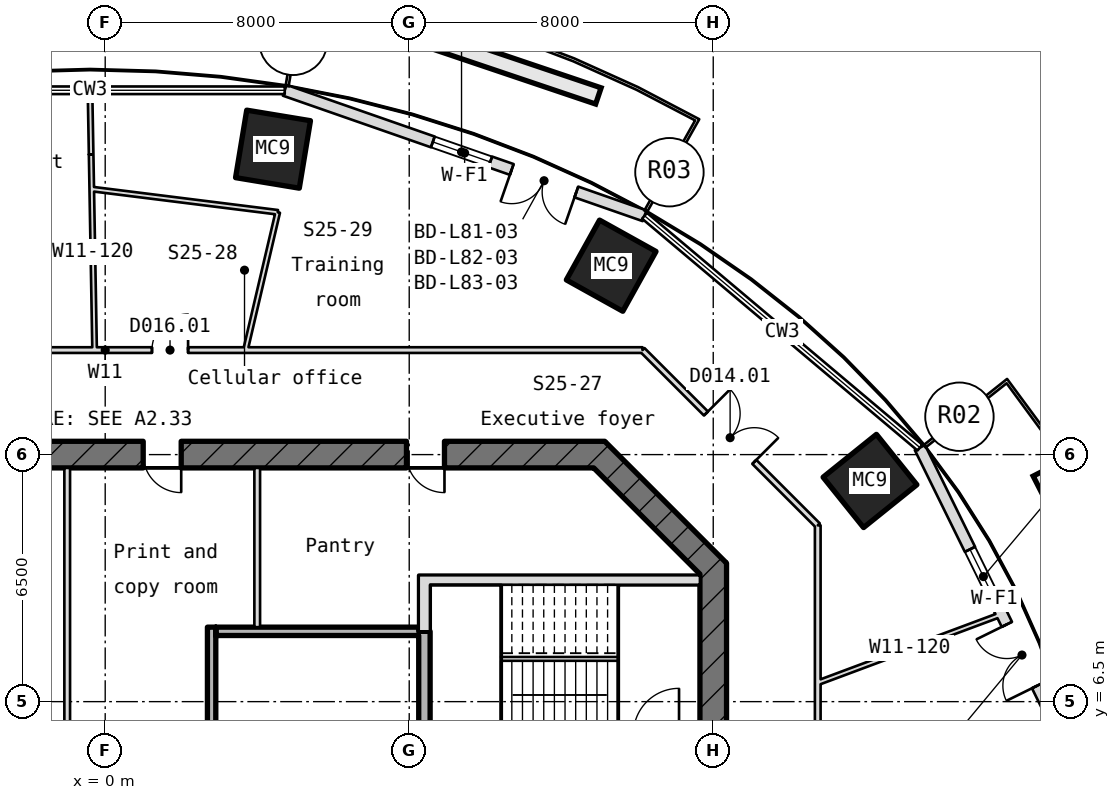
"""IFC4 building model, lengths in metres.
Left out: names, types, materials, properties, quantities, classifications, styles, units other than length and angle.
Written with IfcOpenShell. Run it as: python <this file> out.ifc"""

import sys

from ifc_helpers import new_model, si_unit, direction, frame, frame_2d, origin, origin_2d, place, context, subcontext, project, spatial, rectangle, hollow_rectangle, extrude, element, fill, save


model = new_model("IFC4")
c1 = context("Model", 3, precision=1e-05, world=origin(), true_north=direction((0.0, 1.0)))
c2 = subcontext(c1, "Body", "Model", "MODEL_VIEW")
j1 = project(units=[si_unit("LENGTHUNIT", "METRE"), si_unit("PLANEANGLEUNIT", "RADIAN")], contexts=[c1])
p1 = place(None, origin())
s1 = spatial("IfcSite", under=j1, at=p1, CompositionType="ELEMENT")
p2 = place(p1, origin())
s2 = spatial("IfcBuilding", under=s1, at=p2, CompositionType="ELEMENT")
p3 = place(p2, frame((0.0, 0.0, 359.2)))
s3 = spatial("IfcBuildingStorey", under=s2, at=p3, CompositionType="ELEMENT", Elevation=359.2)
for number, where, z_axis, x_axis in (
    (1, (20.125, 12.306, -0.18), (0.0, 0.0, 1.0), (0.626, -0.78, 0.0)),
    (2, (13.314, 17.971, -0.18), (0.0, 0.0, 1.0), (0.874, -0.486, 0.0)),
    (3, (4.416, 21.037, -0.18), (0.0, 0.0, 1.0), (0.987, -0.163, 0.0)),
):
    element("IfcColumn", number, at=place(p3, frame(where, z_axis=z_axis, x_axis=x_axis)), inside=s3, PredefinedType="COLUMN", context=c2, shape_type="SweptSolid", body=[
        extrude(hollow_rectangle(XDim=1.7, YDim=1.8, WallThickness=0.05, at=origin_2d()), origin(), (0.0, 0.0, 1.0), 4.15),
    ])
p4 = place(p3, frame((25.36, 5.214, 0.0), z_axis=(0.0, 0.0, 1.0), x_axis=(-0.441487983718, 0.897267162128, 0.0)))
e4 = element("IfcWall", 4, at=p4, inside=s3, PredefinedType="SOLIDWALL", context=c2, shape_type="SweptSolid", body=[
    extrude(rectangle(XDim=8.883, YDim=0.3, at=frame_2d((4.442, 0.0))), origin(), (0.0, 0.0, 1.0), 3.97),
])
p5 = place(p4, frame((1.9, 0.0, 0.0)))
e5 = element("IfcOpeningElement", 5, at=p5, cuts=e4, PredefinedType="OPENING", context=c2, shape_type="SweptSolid", body=[
    extrude(rectangle(XDim=1.8, YDim=2.4, at=frame_2d((0.9, 1.2))), frame((0.0, 0.16, 0.0), z_axis=(0.0, -1.0, 0.0), x_axis=(1.0, 0.0, 0.0)), (0.0, 0.0, 1.0), 0.32),
])
p6 = place(p4, frame((4.3, 0.0, 0.9)))
e6 = element("IfcOpeningElement", 6, at=p6, cuts=e4, PredefinedType="OPENING", context=c2, shape_type="SweptSolid", body=[
    extrude(rectangle(XDim=1.6, YDim=1.5, at=frame_2d((0.8, 0.75))), frame((0.0, 0.16, 0.0), z_axis=(0.0, -1.0, 0.0), x_axis=(1.0, 0.0, 0.0)), (0.0, 0.0, 1.0), 0.32),
])
p7 = place(p3, frame((14.192, 19.285, 0.0), z_axis=(0.0, 0.0, 1.0), x_axis=(-0.944239971919, 0.329258068133, 0.0)))
e7 = element("IfcWall", 7, at=p7, inside=s3, PredefinedType="SOLIDWALL", context=c2, shape_type="SweptSolid", body=[
    extrude(rectangle(XDim=10.027, YDim=0.3, at=frame_2d((5.014, 0.0))), origin(), (0.0, 0.0, 1.0), 3.97),
])
p8 = place(p7, frame((1.9, 0.0, 0.0)))
e8 = element("IfcOpeningElement", 8, at=p8, cuts=e7, PredefinedType="OPENING", context=c2, shape_type="SweptSolid", body=[
    extrude(rectangle(XDim=1.8, YDim=2.4, at=frame_2d((0.9, 1.2))), frame((0.0, 0.16, 0.0), z_axis=(0.0, -1.0, 0.0), x_axis=(1.0, 0.0, 0.0)), (0.0, 0.0, 1.0), 0.32),
])
p9 = place(p7, frame((4.3, 0.0, 0.9)))
e9 = element("IfcOpeningElement", 9, at=p9, cuts=e7, PredefinedType="OPENING", context=c2, shape_type="SweptSolid", body=[
    extrude(rectangle(XDim=1.6, YDim=1.5, at=frame_2d((0.8, 0.75))), frame((0.0, 0.16, 0.0), z_axis=(0.0, -1.0, 0.0), x_axis=(1.0, 0.0, 0.0)), (0.0, 0.0, 1.0), 0.32),
])
p10 = place(p3, frame((16.0, -10.145, -0.18), z_axis=(0.0, 0.0, 1.0), x_axis=(0.0, 1.0, 0.0)))
e10 = element("IfcWall", 10, at=p10, inside=s3, PredefinedType="SHEAR", context=c2, shape_type="SweptSolid", body=[
    extrude(rectangle(XDim=20.29, YDim=0.7, at=frame_2d((10.145, 0.0))), origin(), (0.0, 0.0, 1.0), 4.15),
])
p11 = place(p10, frame((8.945, 0.0, 0.18)))
e11 = element("IfcOpeningElement", 11, at=p11, cuts=e10, PredefinedType="OPENING", context=c2, shape_type="SweptSolid", body=[
    extrude(rectangle(XDim=2.4, YDim=2.1, at=frame_2d((1.2, 1.05))), frame((0.0, 0.36, 0.0), z_axis=(0.0, -1.0, 0.0), x_axis=(1.0, 0.0, 0.0)), (0.0, 0.0, 1.0), 0.72),
])
p12 = place(p10, frame((13.545, 0.0, 0.18)))
e12 = element("IfcOpeningElement", 12, at=p12, cuts=e10, PredefinedType="OPENING", context=c2, shape_type="SweptSolid", body=[
    extrude(rectangle(XDim=1.2, YDim=2.1, at=frame_2d((0.6, 1.05))), frame((0.0, 0.36, 0.0), z_axis=(0.0, -1.0, 0.0), x_axis=(1.0, 0.0, 0.0)), (0.0, 0.0, 1.0), 0.72),
])
p13 = place(p10, frame((2.4, 0.0, 0.18)))
e13 = element("IfcOpeningElement", 13, at=p13, cuts=e10, PredefinedType="OPENING", context=c2, shape_type="SweptSolid", body=[
    extrude(rectangle(XDim=1.2, YDim=2.1, at=frame_2d((0.6, 1.05))), frame((0.0, 0.36, 0.0), z_axis=(0.0, -1.0, 0.0), x_axis=(1.0, 0.0, 0.0)), (0.0, 0.0, 1.0), 0.72),
])
p14 = place(p3, frame((16.103, 9.897, -0.18), z_axis=(0.0, 0.0, 1.0), x_axis=(-0.707106781187, 0.707106781187, 0.0)))
e14 = element("IfcWall", 14, at=p14, inside=s3, PredefinedType="SHEAR", context=c2, shape_type="SweptSolid", body=[
    extrude(rectangle(XDim=4.533, YDim=0.7, at=frame_2d((2.266, 0.0))), origin(), (0.0, 0.0, 1.0), 4.15),
])
p15 = place(p3, frame((13.145, 13.0, -0.18), z_axis=(0.0, 0.0, 1.0), x_axis=(-1.0, 0.0, 0.0)))
e15 = element("IfcWall", 15, at=p15, inside=s3, PredefinedType="SHEAR", context=c2, shape_type="SweptSolid", body=[
    extrude(rectangle(XDim=26.29, YDim=0.7, at=frame_2d((13.145, 0.0))), origin(), (0.0, 0.0, 1.0), 4.15),
])
p16 = place(p15, frame((22.573, 0.0, 0.18)))
e16 = element("IfcOpeningElement", 16, at=p16, cuts=e15, PredefinedType="OPENING", context=c2, shape_type="SweptSolid", body=[
    extrude(rectangle(XDim=1.0, YDim=2.1, at=frame_2d((0.5, 1.05))), frame((0.0, 0.36, 0.0), z_axis=(0.0, -1.0, 0.0), x_axis=(1.0, 0.0, 0.0)), (0.0, 0.0, 1.0), 0.72),
])
p17 = place(p15, frame((16.645, 0.0, 0.18)))
e17 = element("IfcOpeningElement", 17, at=p17, cuts=e15, PredefinedType="OPENING", context=c2, shape_type="SweptSolid", body=[
    extrude(rectangle(XDim=1.0, YDim=2.1, at=frame_2d((0.5, 1.05))), frame((0.0, 0.36, 0.0), z_axis=(0.0, -1.0, 0.0), x_axis=(1.0, 0.0, 0.0)), (0.0, 0.0, 1.0), 0.72),
])
p18 = place(p15, frame((11.145, 0.0, 0.18)))
e18 = element("IfcOpeningElement", 18, at=p18, cuts=e15, PredefinedType="OPENING", context=c2, shape_type="SweptSolid", body=[
    extrude(rectangle(XDim=1.0, YDim=2.1, at=frame_2d((0.5, 1.05))), frame((0.0, 0.36, 0.0), z_axis=(0.0, -1.0, 0.0), x_axis=(1.0, 0.0, 0.0)), (0.0, 0.0, 1.0), 0.72),
])
p19 = place(p15, frame((4.217, 0.0, 0.18)))
e19 = element("IfcOpeningElement", 19, at=p19, cuts=e15, PredefinedType="OPENING", context=c2, shape_type="SweptSolid", body=[
    extrude(rectangle(XDim=1.0, YDim=2.1, at=frame_2d((0.5, 1.05))), frame((0.0, 0.36, 0.0), z_axis=(0.0, -1.0, 0.0), x_axis=(1.0, 0.0, 0.0)), (0.0, 0.0, 1.0), 0.72),
])
p20 = place(p3, frame((2.91, 8.35, 0.0), z_axis=(0.0, 0.0, 1.0), x_axis=(1.0, 0.0, 0.0)))
e20 = element("IfcWall", 20, at=p20, inside=s3, PredefinedType="STANDARD", context=c2, shape_type="SweptSolid", body=[
    extrude(rectangle(XDim=5.34, YDim=0.22, at=frame_2d((2.67, 0.0))), origin(), (0.0, 0.0, 1.0), 3.97),
])
p21 = place(p3, frame((8.55, 9.7, -0.18), z_axis=(0.0, 0.0, 1.0), x_axis=(1.0, 0.0, 0.0)))
e21 = element("IfcWall", 21, at=p21, inside=s3, PredefinedType="SHEAR", context=c2, shape_type="SweptSolid", body=[
    extrude(rectangle(XDim=7.1, YDim=0.25, at=frame_2d((3.55, 0.0))), origin(), (0.0, 0.0, 1.0), 4.15),
])
p22 = place(p3, frame((-1.0, 5.425, 0.0), z_axis=(0.0, 0.0, 1.0), x_axis=(0.0, 1.0, 0.0)))
e22 = element("IfcWall", 22, at=p22, inside=s3, PredefinedType="PARTITIONING", context=c2, shape_type="SweptSolid", body=[
    extrude(rectangle(XDim=7.225, YDim=0.15, at=frame_2d((3.612, 0.0))), origin(), (0.0, 0.0, 1.0), 3.97),
])
p23 = place(p3, frame((2.8, 5.46, 0.0), z_axis=(0.0, 0.0, 1.0), x_axis=(0.0, 1.0, 0.0)))
e23 = element("IfcWall", 23, at=p23, inside=s3, PredefinedType="STANDARD", context=c2, shape_type="SweptSolid", body=[
    extrude(rectangle(XDim=3.0, YDim=0.22, at=frame_2d((1.5, 0.0))), origin(), (0.0, 0.0, 1.0), 3.97),
])
p24 = place(p3, frame((4.0, 8.46, 0.0), z_axis=(0.0, 0.0, 1.0), x_axis=(0.0, 1.0, 0.0)))
e24 = element("IfcWall", 24, at=p24, inside=s3, PredefinedType="PARTITIONING", context=c2, shape_type="SweptSolid", body=[
    extrude(rectangle(XDim=4.19, YDim=0.15, at=frame_2d((2.095, 0.0))), origin(), (0.0, 0.0, 1.0), 3.97),
])
p25 = place(p3, frame((8.4, 2.5, -0.18), z_axis=(0.0, 0.0, 1.0), x_axis=(0.0, 1.0, 0.0)))
e25 = element("IfcWall", 25, at=p25, inside=s3, PredefinedType="SHEAR", context=c2, shape_type="SweptSolid", body=[
    extrude(rectangle(XDim=5.85, YDim=0.3, at=frame_2d((2.925, 0.0))), origin(), (0.0, 0.0, 1.0), 4.15),
])
p26 = place(p3, frame((8.4, 8.35, -0.18), z_axis=(0.0, 0.0, 1.0), x_axis=(0.0, 1.0, 0.0)))
e26 = element("IfcWall", 26, at=p26, inside=s3, PredefinedType="SHEAR", context=c2, shape_type="SweptSolid", body=[
    extrude(rectangle(XDim=1.475, YDim=0.3, at=frame_2d((0.737, 0.0))), origin(), (0.0, 0.0, 1.0), 4.15),
])
p27 = place(p3, frame((-14.139, 15.75, 0.0), z_axis=(0.0, 0.0, 1.0), x_axis=(1.0, 0.0, 0.0)))
e27 = element("IfcWall", 27, at=p27, inside=s3, PredefinedType="PARTITIONING", context=c2, shape_type="SweptSolid", body=[
    extrude(rectangle(XDim=28.278, YDim=0.15, at=frame_2d((14.139, 0.0))), origin(), (0.0, 0.0, 1.0), 3.97),
])
p28 = place(p27, frame((15.37, 0.0, 0.0)))
e28 = element("IfcOpeningElement", 28, at=p28, cuts=e27, PredefinedType="OPENING", context=c2, shape_type="SweptSolid", body=[
    extrude(rectangle(XDim=0.95, YDim=2.1, at=frame_2d((0.475, 1.05))), frame((0.0, 0.085, 0.0), z_axis=(0.0, -1.0, 0.0), x_axis=(1.0, 0.0, 0.0)), (0.0, 0.0, 1.0), 0.17),
])
p29 = place(p27, frame((10.081, 0.0, 0.0)))
e29 = element("IfcOpeningElement", 29, at=p29, cuts=e27, PredefinedType="OPENING", context=c2, shape_type="SweptSolid", body=[
    extrude(rectangle(XDim=0.95, YDim=2.1, at=frame_2d((0.475, 1.05))), frame((0.0, 0.085, 0.0), z_axis=(0.0, -1.0, 0.0), x_axis=(1.0, 0.0, 0.0)), (0.0, 0.0, 1.0), 0.17),
])
p30 = place(p27, frame((5.076, 0.0, 0.0)))
e30 = element("IfcOpeningElement", 30, at=p30, cuts=e27, PredefinedType="OPENING", context=c2, shape_type="SweptSolid", body=[
    extrude(rectangle(XDim=0.95, YDim=2.1, at=frame_2d((0.475, 1.05))), frame((0.0, 0.085, 0.0), z_axis=(0.0, -1.0, 0.0), x_axis=(1.0, 0.0, 0.0)), (0.0, 0.0, 1.0), 0.17),
])
p31 = place(p27, frame((1.45, 0.0, 0.0)))
e31 = element("IfcOpeningElement", 31, at=p31, cuts=e27, PredefinedType="OPENING", context=c2, shape_type="SweptSolid", body=[
    extrude(rectangle(XDim=0.95, YDim=2.1, at=frame_2d((0.475, 1.05))), frame((0.0, 0.085, 0.0), z_axis=(0.0, -1.0, 0.0), x_axis=(1.0, 0.0, 0.0)), (0.0, 0.0, 1.0), 0.17),
])
p32 = place(p3, frame((-0.279, 15.75, 0.0), z_axis=(0.0, 0.0, 1.0), x_axis=(-0.017734938517, 0.99984272361, 0.0)))
e32 = element("IfcWall", 32, at=p32, inside=s3, PredefinedType="PARTITIONING", context=c2, shape_type="SweptSolid", body=[
    extrude(rectangle(XDim=5.148, YDim=0.12, at=frame_2d((2.574, 0.0))), origin(), (0.0, 0.0, 1.0), 3.617),
])
p33 = place(p3, frame((-0.37, 20.898, 0.0), z_axis=(0.0, 0.0, 1.0), x_axis=(-0.017637510488, 0.999844447014, 0.0)))
e33 = element("IfcWall", 33, at=p33, inside=s3, PredefinedType="PARTITIONING", context=c2, shape_type="SweptSolid", body=[
    extrude(rectangle(XDim=1.689, YDim=0.12, at=frame_2d((0.844, 0.0))), origin(), (0.0, 0.0, 1.0), 3.97),
])
p34 = place(p3, frame((4.541, 19.376, 0.0), z_axis=(0.0, 0.0, 1.0), x_axis=(-0.99227254585, 0.124077374056, 0.0)))
e34 = element("IfcWall", 34, at=p34, inside=s3, PredefinedType="PARTITIONING", context=c2, shape_type="SweptSolid", body=[
    extrude(rectangle(XDim=4.933, YDim=0.12, at=frame_2d((2.466, 0.0))), origin(), (0.0, 0.0, 1.0), 3.97),
])
p35 = place(p3, frame((4.541, 19.376, 0.0), z_axis=(0.0, 0.0, 1.0), x_axis=(-0.228180642974, -0.973618813588, 0.0)))
e35 = element("IfcWall", 35, at=p35, inside=s3, PredefinedType="PARTITIONING", context=c2, shape_type="SweptSolid", body=[
    extrude(rectangle(XDim=3.724, YDim=0.12, at=frame_2d((1.862, 0.0))), origin(), (0.0, 0.0, 1.0), 3.97),
])
p36 = place(p3, frame((14.139, 15.75, 0.0), z_axis=(0.0, 0.0, 1.0), x_axis=(0.707106781187, -0.707106781187, 0.0)))
e36 = element("IfcWall", 36, at=p36, inside=s3, PredefinedType="PARTITIONING", context=c2, shape_type="SweptSolid", body=[
    extrude(rectangle(XDim=6.521, YDim=0.15, at=frame_2d((3.26, 0.0))), origin(), (0.0, 0.0, 1.0), 3.97),
])
p37 = place(p36, frame((2.36, 0.0, 0.0)))
e37 = element("IfcOpeningElement", 37, at=p37, cuts=e36, PredefinedType="OPENING", context=c2, shape_type="SweptSolid", body=[
    extrude(rectangle(XDim=1.8, YDim=2.1, at=frame_2d((0.9, 1.05))), frame((0.0, 0.085, 0.0), z_axis=(0.0, -1.0, 0.0), x_axis=(1.0, 0.0, 0.0)), (0.0, 0.0, 1.0), 0.17),
])
p38 = place(p3, frame((18.75, 6.995, 0.0), z_axis=(0.0, 0.0, 1.0), x_axis=(0.936919672461, 0.349544742994, 0.0)))
e38 = element("IfcWall", 38, at=p38, inside=s3, PredefinedType="PARTITIONING", context=c2, shape_type="SweptSolid", body=[
    extrude(rectangle(XDim=5.171, YDim=0.12, at=frame_2d((2.585, 0.0))), origin(), (0.0, 0.0, 1.0), 3.97),
])
p39 = place(p3, frame((18.75, 11.139, 0.0), z_axis=(0.0, 0.0, 1.0), x_axis=(0.0, -1.0, 0.0)))
e39 = element("IfcWall", 39, at=p39, inside=s3, PredefinedType="PARTITIONING", context=c2, shape_type="SweptSolid", body=[
    extrude(rectangle(XDim=22.278, YDim=0.15, at=frame_2d((11.139, 0.0))), origin(), (0.0, 0.0, 1.0), 3.97),
])
p40 = place(p39, frame((12.736, 0.0, 0.0)))
e40 = element("IfcOpeningElement", 40, at=p40, cuts=e39, PredefinedType="OPENING", context=c2, shape_type="SweptSolid", body=[
    extrude(rectangle(XDim=0.95, YDim=2.1, at=frame_2d((0.475, 1.05))), frame((0.0, 0.085, 0.0), z_axis=(0.0, -1.0, 0.0), x_axis=(1.0, 0.0, 0.0)), (0.0, 0.0, 1.0), 0.17),
])
p41 = place(p5, origin())
e41 = element("IfcDoor", 41, at=p41, inside=s3, OperationType="SINGLE_SWING_LEFT", PredefinedType="DOOR", context=c2, shape_type="SweptSolid", body=[
    extrude(rectangle(XDim=1.8, YDim=2.4, at=frame_2d((0.9, 1.2))), frame((0.0, 0.025, 0.0), z_axis=(0.0, -1.0, 0.0), x_axis=(1.0, 0.0, 0.0)), (0.0, 0.0, 1.0), 0.05),
])
fill(e5, e41)
p42 = place(p6, origin())
e42 = element("IfcWindow", 42, at=p42, inside=s3, PartitioningType="SINGLE_PANEL", PredefinedType="WINDOW", context=c2, shape_type="SweptSolid", body=[
    extrude(rectangle(XDim=1.6, YDim=1.5, at=frame_2d((0.8, 0.75))), frame((0.0, 0.03, 0.0), z_axis=(0.0, -1.0, 0.0), x_axis=(1.0, 0.0, 0.0)), (0.0, 0.0, 1.0), 0.06),
])
fill(e6, e42)
p43 = place(p8, origin())
e43 = element("IfcDoor", 43, at=p43, inside=s3, OperationType="SINGLE_SWING_LEFT", PredefinedType="DOOR", context=c2, shape_type="SweptSolid", body=[
    extrude(rectangle(XDim=1.8, YDim=2.4, at=frame_2d((0.9, 1.2))), frame((0.0, 0.025, 0.0), z_axis=(0.0, -1.0, 0.0), x_axis=(1.0, 0.0, 0.0)), (0.0, 0.0, 1.0), 0.05),
])
fill(e8, e43)
p44 = place(p9, origin())
e44 = element("IfcWindow", 44, at=p44, inside=s3, PartitioningType="SINGLE_PANEL", PredefinedType="WINDOW", context=c2, shape_type="SweptSolid", body=[
    extrude(rectangle(XDim=1.6, YDim=1.5, at=frame_2d((0.8, 0.75))), frame((0.0, 0.03, 0.0), z_axis=(0.0, -1.0, 0.0), x_axis=(1.0, 0.0, 0.0)), (0.0, 0.0, 1.0), 0.06),
])
fill(e9, e44)
p45 = place(p18, origin())
e45 = element("IfcDoor", 45, at=p45, inside=s3, OperationType="SINGLE_SWING_RIGHT", PredefinedType="DOOR", context=c2, shape_type="SweptSolid", body=[
    extrude(rectangle(XDim=1.0, YDim=2.1, at=frame_2d((0.5, 1.05))), frame((0.0, 0.025, 0.0), z_axis=(0.0, -1.0, 0.0), x_axis=(1.0, 0.0, 0.0)), (0.0, 0.0, 1.0), 0.05),
])
fill(e18, e45)
p46 = place(p19, origin())
e46 = element("IfcDoor", 46, at=p46, inside=s3, OperationType="SINGLE_SWING_RIGHT", PredefinedType="DOOR", context=c2, shape_type="SweptSolid", body=[
    extrude(rectangle(XDim=1.0, YDim=2.1, at=frame_2d((0.5, 1.05))), frame((0.0, 0.025, 0.0), z_axis=(0.0, -1.0, 0.0), x_axis=(1.0, 0.0, 0.0)), (0.0, 0.0, 1.0), 0.05),
])
fill(e19, e46)
p47 = place(p28, origin())
e47 = element("IfcDoor", 47, at=p47, inside=s3, OperationType="SINGLE_SWING_RIGHT", PredefinedType="DOOR", context=c2, shape_type="SweptSolid", body=[
    extrude(rectangle(XDim=0.95, YDim=2.1, at=frame_2d((0.475, 1.05))), frame((0.0, 0.025, 0.0), z_axis=(0.0, -1.0, 0.0), x_axis=(1.0, 0.0, 0.0)), (0.0, 0.0, 1.0), 0.05),
])
fill(e28, e47)
p48 = place(p37, origin())
e48 = element("IfcDoor", 48, at=p48, inside=s3, OperationType="DOUBLE_DOOR_SINGLE_SWING", PredefinedType="DOOR", context=c2, shape_type="SweptSolid", body=[
    extrude(rectangle(XDim=1.8, YDim=2.1, at=frame_2d((0.9, 1.05))), frame((0.0, 0.025, 0.0), z_axis=(0.0, -1.0, 0.0), x_axis=(1.0, 0.0, 0.0)), (0.0, 0.0, 1.0), 0.05),
])
fill(e37, e48)
save(model, sys.argv[1])
